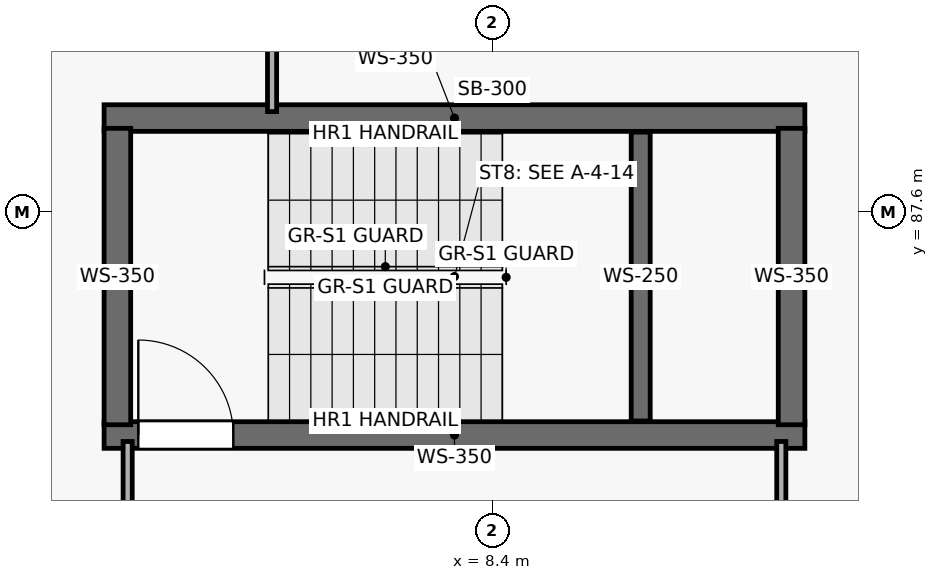
"""IFC4 building model, lengths in metres.
Left out: names, types, materials, properties, quantities, classifications, styles, units other than length and angle.
Written with IfcOpenShell. Run it as: python <this file> out.ifc"""

import sys

from ifc_helpers import new_model, si_unit, direction, frame, frame_2d, origin, place, context, subcontext, project, spatial, rectangle, extrude, element, fill, save


model = new_model("IFC4")
c1 = context("Model", 3, precision=1e-05, world=origin(), true_north=direction((0.0, 1.0)))
c2 = subcontext(c1, "Body", "Model", "MODEL_VIEW")
j1 = project(units=[si_unit("LENGTHUNIT", "METRE"), si_unit("PLANEANGLEUNIT", "RADIAN")], contexts=[c1])
p1 = place(None, origin())
s1 = spatial("IfcSite", under=j1, at=p1, CompositionType="ELEMENT")
p2 = place(p1, origin())
s2 = spatial("IfcBuilding", under=s1, at=p2, CompositionType="ELEMENT")
p3 = place(p2, frame((0.0, 0.0, -4.5)))
s3 = spatial("IfcBuildingStorey", under=s2, at=p3, CompositionType="ELEMENT", Elevation=-4.5)
p4 = place(p3, frame((3.29, 84.665, 0.0), z_axis=(0.0, 0.0, 1.0), x_axis=(1.0, 0.0, 0.0)))
e1 = element("IfcWall", 1, at=p4, inside=s3, PredefinedType="SHEAR", context=c2, shape_type="SweptSolid", body=[
    extrude(rectangle(XDim=9.22, YDim=0.35, at=frame_2d((4.61, 0.0))), origin(), (0.0, 0.0, 1.0), 4.22),
])
p5 = place(p4, frame((0.45, 0.0, 0.0)))
e2 = element("IfcOpeningElement", 2, at=p5, cuts=e1, PredefinedType="OPENING", context=c2, shape_type="SweptSolid", body=[
    extrude(rectangle(XDim=1.25, YDim=2.2, at=frame_2d((0.625, 1.1))), frame((0.0, 0.185, 0.0), z_axis=(0.0, -1.0, 0.0), x_axis=(1.0, 0.0, 0.0)), (0.0, 0.0, 1.0), 0.37),
])
p6 = place(p3, frame((12.51, 88.835, 0.0), z_axis=(0.0, 0.0, 1.0), x_axis=(-1.0, 0.0, 0.0)))
e3 = element("IfcWall", 3, at=p6, inside=s3, PredefinedType="SHEAR", context=c2, shape_type="SweptSolid", body=[
    extrude(rectangle(XDim=9.22, YDim=0.35, at=frame_2d((4.61, 0.0))), origin(), (0.0, 0.0, 1.0), 4.22),
])
for number, where, z_axis, x_axis in (
    (4, (3.465, 84.8, 0.0), (0.0, 0.0, 1.0), (0.0, 1.0, 0.0)),
    (5, (12.335, 88.7, 0.0), (0.0, 0.0, 1.0), (0.0, -1.0, 0.0)),
):
    element("IfcWall", number, at=place(p3, frame(where, z_axis=z_axis, x_axis=x_axis)), inside=s3, PredefinedType="SHEAR", context=c2, shape_type="SweptSolid", body=[
        extrude(rectangle(XDim=3.9, YDim=0.35, at=frame_2d((1.95, 0.0))), origin(), (0.0, 0.0, 1.0), 4.22),
    ])
p7 = place(p3, frame((10.35, 84.85, 0.0), z_axis=(0.0, 0.0, 1.0), x_axis=(0.0, 1.0, 0.0)))
e6 = element("IfcWall", 6, at=p7, inside=s3, PredefinedType="SHEAR", context=c2, shape_type="SweptSolid", body=[
    extrude(rectangle(XDim=3.8, YDim=0.25, at=frame_2d((1.9, 0.0))), origin(), (0.0, 0.0, 1.0), 2.07),
])
p8 = place(p3, frame((5.5, 110.34, 0.0), z_axis=(0.0, 0.0, 1.0), x_axis=(0.0, -1.0, 0.0)))
e7 = element("IfcWall", 7, at=p8, inside=s3, PredefinedType="PARTITIONING", context=c2, shape_type="SweptSolid", body=[
    extrude(rectangle(XDim=21.42, YDim=0.12, at=frame_2d((10.71, 0.0))), origin(), (0.0, 0.0, 1.0), 4.22),
])
for number, where, z_axis, x_axis in (
    (8, (3.6, 84.58, 0.0), (0.0, 0.0, 1.0), (0.0, -1.0, 0.0)),
    (9, (12.2, 81.8, 0.0), (0.0, 0.0, 1.0), (0.0, 1.0, 0.0)),
):
    element("IfcWall", number, at=place(p3, frame(where, z_axis=z_axis, x_axis=x_axis)), inside=s3, PredefinedType="PARTITIONING", context=c2, shape_type="SweptSolid", body=[
        extrude(rectangle(XDim=2.78, YDim=0.12, at=frame_2d((1.39, 0.0))), origin(), (0.0, 0.0, 1.0), 4.22),
    ])
p9 = place(p5, origin())
e10 = element("IfcDoor", 10, at=p9, inside=s3, OperationType="SINGLE_SWING_LEFT", PredefinedType="DOOR", context=c2, shape_type="SweptSolid", body=[
    extrude(rectangle(XDim=1.25, YDim=2.2, at=frame_2d((0.625, 1.1))), frame((0.0, 0.025, 0.0), z_axis=(0.0, -1.0, 0.0), x_axis=(1.0, 0.0, 0.0)), (0.0, 0.0, 1.0), 0.05),
])
fill(e2, e10)
save(model, sys.argv[1])
